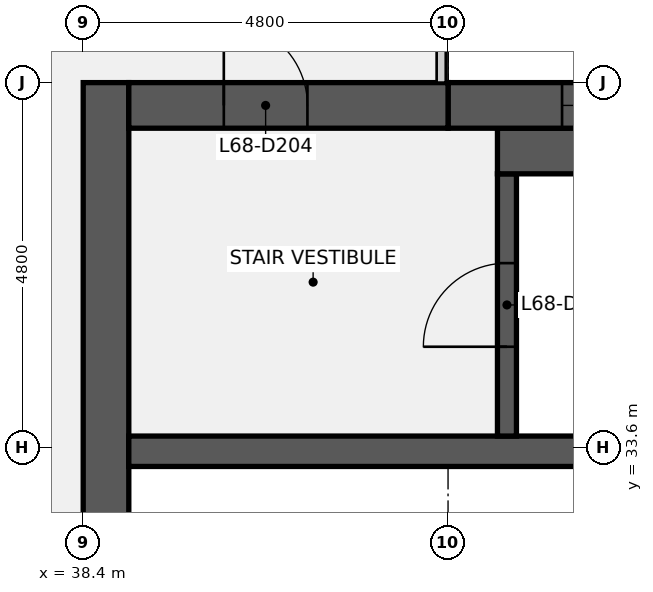
"""IFC4 building model, lengths in metres.
Left out: names, types, materials, properties, quantities, classifications, styles, units other than length and angle.
Written with IfcOpenShell. Run it as: python <this file> out.ifc"""

import sys

from ifc_helpers import new_model, si_unit, direction, frame, frame_2d, origin, place, context, subcontext, project, spatial, rectangle, extrude, element, fill, save


model = new_model("IFC4")
c1 = context("Model", 3, precision=1e-05, world=origin(), true_north=direction((0.0, 1.0)))
c2 = subcontext(c1, "Body", "Model", "MODEL_VIEW")
j1 = project(units=[si_unit("LENGTHUNIT", "METRE"), si_unit("PLANEANGLEUNIT", "RADIAN")], contexts=[c1])
p1 = place(None, origin())
s1 = spatial("IfcSite", under=j1, at=p1, CompositionType="ELEMENT")
p2 = place(p1, origin())
s2 = spatial("IfcBuilding", under=s1, at=p2, CompositionType="ELEMENT")
p3 = place(p2, frame((0.0, 0.0, 310.3)))
s3 = spatial("IfcBuildingStorey", under=s2, at=p3, CompositionType="ELEMENT", Elevation=310.3)
p4 = place(p3, frame((38.7, 9.6, 0.0), z_axis=(0.0, 0.0, 1.0), x_axis=(0.0, 1.0, 0.0)))
e1 = element("IfcWall", 1, at=p4, inside=s3, PredefinedType="SHEAR", context=c2, shape_type="SweptSolid", body=[
    extrude(rectangle(XDim=28.8, YDim=0.6, at=frame_2d((14.4, 0.0))), origin(), (0.0, 0.0, 1.0), 3.84),
])
p5 = place(p4, frame((8.7, 0.0, 0.0)))
e2 = element("IfcOpeningElement", 2, at=p5, cuts=e1, PredefinedType="OPENING", context=c2, shape_type="SweptSolid", body=[
    extrude(rectangle(XDim=1.8, YDim=2.1, at=frame_2d((0.9, 1.05))), frame((0.0, 0.31, 0.0), z_axis=(0.0, -1.0, 0.0), x_axis=(1.0, 0.0, 0.0)), (0.0, 0.0, 1.0), 0.62),
])
p6 = place(p4, frame((18.3, 0.0, 0.0)))
e3 = element("IfcOpeningElement", 3, at=p6, cuts=e1, PredefinedType="OPENING", context=c2, shape_type="SweptSolid", body=[
    extrude(rectangle(XDim=1.8, YDim=2.1, at=frame_2d((0.9, 1.05))), frame((0.0, 0.31, 0.0), z_axis=(0.0, -1.0, 0.0), x_axis=(1.0, 0.0, 0.0)), (0.0, 0.0, 1.0), 0.62),
])
p7 = place(p3, frame((39.0, 33.55, 0.0), z_axis=(0.0, 0.0, 1.0), x_axis=(1.0, 0.0, 0.0)))
e4 = element("IfcWall", 4, at=p7, inside=s3, PredefinedType="SHEAR", context=c2, shape_type="SweptSolid", body=[
    extrude(rectangle(XDim=18.0, YDim=0.4, at=frame_2d((9.0, 0.0))), origin(), (0.0, 0.0, 1.0), 3.84),
])
p8 = place(p3, frame((43.975, 33.75, 0.0), z_axis=(0.0, 0.0, 1.0), x_axis=(0.0, 1.0, 0.0)))
e5 = element("IfcWall", 5, at=p8, inside=s3, PredefinedType="SHEAR", context=c2, shape_type="SweptSolid", body=[
    extrude(rectangle(XDim=3.45, YDim=0.25, at=frame_2d((1.725, 0.0))), origin(), (0.0, 0.0, 1.0), 3.84),
])
p9 = place(p8, frame((1.175, 0.0, 0.0)))
e6 = element("IfcOpeningElement", 6, at=p9, cuts=e5, PredefinedType="OPENING", context=c2, shape_type="SweptSolid", body=[
    extrude(rectangle(XDim=1.1, YDim=2.1, at=frame_2d((0.55, 1.05))), frame((0.0, 0.135, 0.0), z_axis=(0.0, -1.0, 0.0), x_axis=(1.0, 0.0, 0.0)), (0.0, 0.0, 1.0), 0.27),
])
p10 = place(p3, frame((43.85, 37.5, 0.0), z_axis=(0.0, 0.0, 1.0), x_axis=(1.0, 0.0, 0.0)))
e7 = element("IfcWall", 7, at=p10, inside=s3, PredefinedType="SHEAR", context=c2, shape_type="SweptSolid", body=[
    extrude(rectangle(XDim=7.5, YDim=0.6, at=frame_2d((3.75, 0.0))), origin(), (0.0, 0.0, 1.0), 3.84),
])
p11 = place(p3, frame((43.2, 38.1, 0.0), z_axis=(0.0, 0.0, 1.0), x_axis=(1.0, 0.0, 0.0)))
e8 = element("IfcWall", 8, at=p11, inside=s3, PredefinedType="SHEAR", context=c2, shape_type="SweptSolid", body=[
    extrude(rectangle(XDim=13.8, YDim=0.6, at=frame_2d((6.9, 0.0))), origin(), (0.0, 0.0, 1.0), 3.84),
])
p12 = place(p11, frame((6.3, 0.0, 0.9)))
e9 = element("IfcOpeningElement", 9, at=p12, cuts=e8, PredefinedType="OPENING", context=c2, shape_type="SweptSolid", body=[
    extrude(rectangle(XDim=1.8, YDim=1.5, at=frame_2d((0.9, 0.75))), frame((0.0, 0.31, 0.0), z_axis=(0.0, -1.0, 0.0), x_axis=(1.0, 0.0, 0.0)), (0.0, 0.0, 1.0), 0.62),
])
p13 = place(p11, frame((1.5, 0.0, 0.9)))
e10 = element("IfcOpeningElement", 10, at=p13, cuts=e8, PredefinedType="OPENING", context=c2, shape_type="SweptSolid", body=[
    extrude(rectangle(XDim=1.8, YDim=1.5, at=frame_2d((0.9, 0.75))), frame((0.0, 0.31, 0.0), z_axis=(0.0, -1.0, 0.0), x_axis=(1.0, 0.0, 0.0)), (0.0, 0.0, 1.0), 0.62),
])
p14 = place(p3, frame((39.0, 38.1, 0.0), z_axis=(0.0, 0.0, 1.0), x_axis=(1.0, 0.0, 0.0)))
e11 = element("IfcWall", 11, at=p14, inside=s3, PredefinedType="SHEAR", context=c2, shape_type="SweptSolid", body=[
    extrude(rectangle(XDim=4.2, YDim=0.6, at=frame_2d((2.1, 0.0))), origin(), (0.0, 0.0, 1.0), 3.84),
])
p15 = place(p14, frame((1.25, 0.0, 0.0)))
e12 = element("IfcOpeningElement", 12, at=p15, cuts=e11, PredefinedType="OPENING", context=c2, shape_type="SweptSolid", body=[
    extrude(rectangle(XDim=1.1, YDim=2.1, at=frame_2d((0.55, 1.05))), frame((0.0, 0.31, 0.0), z_axis=(0.0, -1.0, 0.0), x_axis=(1.0, 0.0, 0.0)), (0.0, 0.0, 1.0), 0.62),
])
p16 = place(p9, origin())
e13 = element("IfcDoor", 13, at=p16, inside=s3, OperationType="SINGLE_SWING_LEFT", PredefinedType="DOOR", context=c2, shape_type="SweptSolid", body=[
    extrude(rectangle(XDim=1.1, YDim=2.1, at=frame_2d((0.55, 1.05))), frame((0.0, 0.025, 0.0), z_axis=(0.0, -1.0, 0.0), x_axis=(1.0, 0.0, 0.0)), (0.0, 0.0, 1.0), 0.05),
])
fill(e6, e13)
p17 = place(p15, origin())
e14 = element("IfcDoor", 14, at=p17, inside=s3, OperationType="SINGLE_SWING_LEFT", PredefinedType="DOOR", context=c2, shape_type="SweptSolid", body=[
    extrude(rectangle(XDim=1.1, YDim=2.1, at=frame_2d((0.55, 1.05))), frame((0.0, 0.025, 0.0), z_axis=(0.0, -1.0, 0.0), x_axis=(1.0, 0.0, 0.0)), (0.0, 0.0, 1.0), 0.05),
])
fill(e12, e14)
p18 = place(p13, origin())
e15 = element("IfcWindow", 15, at=p18, inside=s3, PartitioningType="SINGLE_PANEL", PredefinedType="WINDOW", context=c2, shape_type="SweptSolid", body=[
    extrude(rectangle(XDim=1.8, YDim=1.5, at=frame_2d((0.9, 0.75))), frame((0.0, 0.03, 0.0), z_axis=(0.0, -1.0, 0.0), x_axis=(1.0, 0.0, 0.0)), (0.0, 0.0, 1.0), 0.06),
])
fill(e10, e15)
save(model, sys.argv[1])
